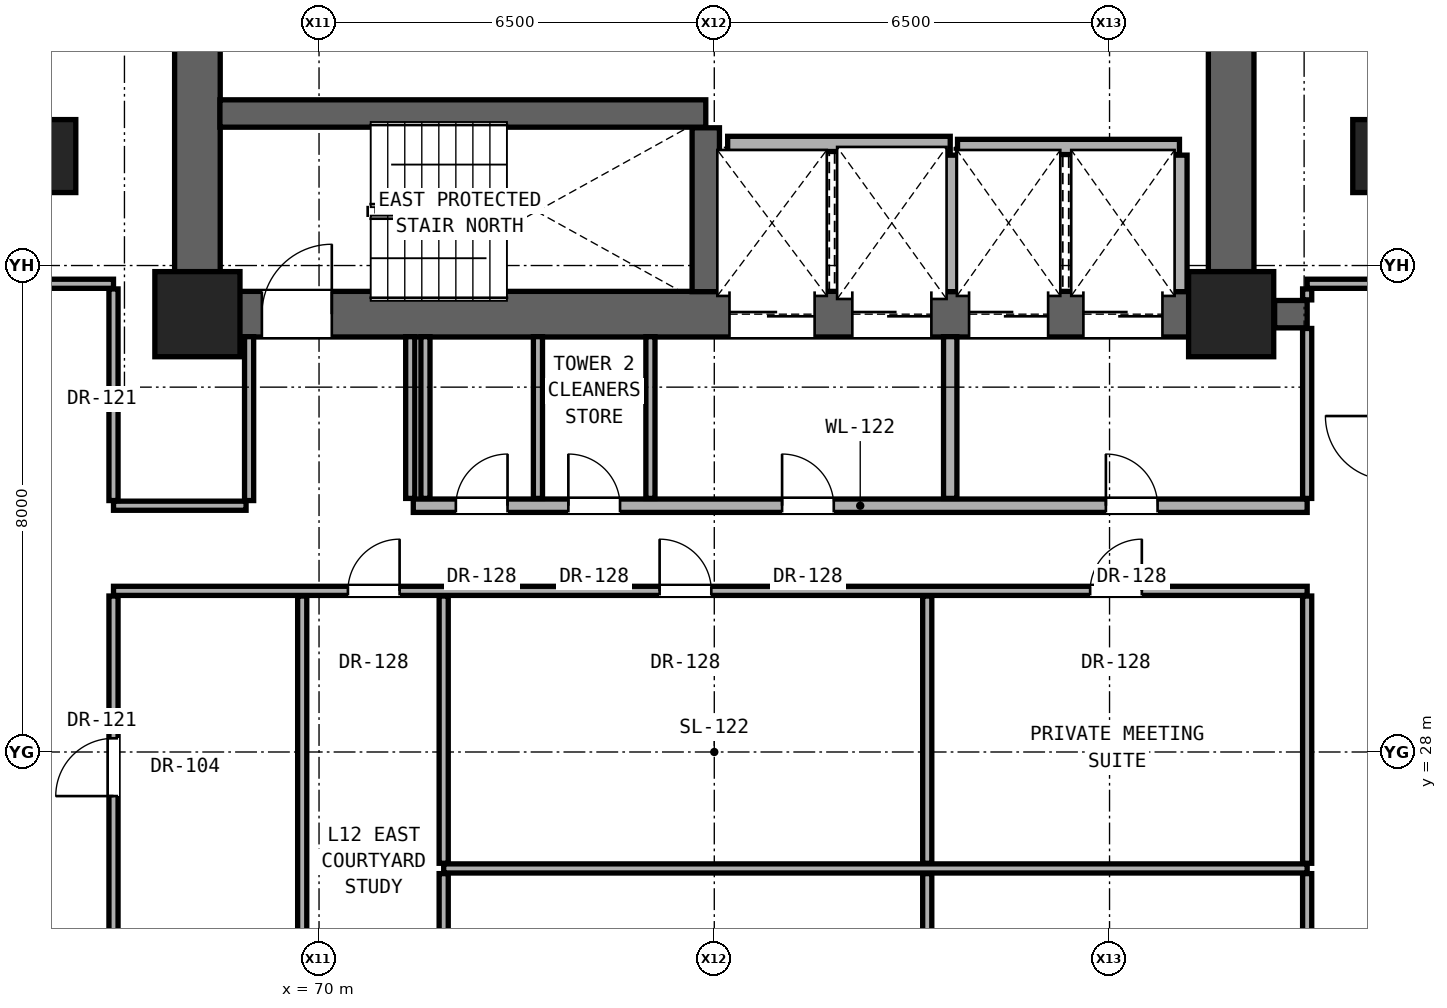
"""IFC4 building model, lengths in metres.
Left out: names, types, materials, properties, quantities, classifications, styles, units other than length and angle.
Written with IfcOpenShell. Run it as: python <this file> out.ifc"""

import sys

from ifc_helpers import new_model, si_unit, direction, frame, frame_2d, origin, origin_2d, place, context, subcontext, project, spatial, rectangle, extrude, element, fill, save


model = new_model("IFC4")
c1 = context("Model", 3, precision=1e-05, world=origin(), true_north=direction((0.0, 1.0)))
c2 = subcontext(c1, "Body", "Model", "MODEL_VIEW")
j1 = project(units=[si_unit("LENGTHUNIT", "METRE"), si_unit("PLANEANGLEUNIT", "RADIAN")], contexts=[c1])
p1 = place(None, origin())
s1 = spatial("IfcSite", under=j1, at=p1, CompositionType="ELEMENT")
p2 = place(p1, origin())
s2 = spatial("IfcBuilding", under=s1, at=p2, CompositionType="ELEMENT")
p3 = place(p2, frame((0.0, 0.0, 45.5)))
s3 = spatial("IfcBuildingStorey", under=s2, at=p3, CompositionType="ELEMENT", Elevation=45.5)
for number, where, z_axis, x_axis in (
    (1, (68.0, 35.2, 0.0), (0.0, 0.0, 1.0), (1.0, 0.0, 0.0)),
    (2, (85.0, 35.2, 0.0), (0.0, 0.0, 1.0), (1.0, 0.0, 0.0)),
):
    element("IfcColumn", number, at=place(p3, frame(where, z_axis=z_axis, x_axis=x_axis)), inside=s3, PredefinedType="COLUMN", context=c2, shape_type="SweptSolid", body=[
        extrude(rectangle(XDim=1.4, YDim=1.4, at=origin_2d()), origin(), (0.0, 0.0, 1.0), 3.3),
    ])
for number, where, z_axis, x_axis in (
    (3, (65.6, 37.8, 0.0), (0.0, 0.0, 1.0), (1.0, 0.0, 0.0)),
    (4, (87.4, 37.8, 0.0), (0.0, 0.0, 1.0), (1.0, 0.0, 0.0)),
):
    element("IfcColumn", number, at=place(p3, frame(where, z_axis=z_axis, x_axis=x_axis)), inside=s3, PredefinedType="PILASTER", context=c2, shape_type="SweptSolid", body=[
        extrude(rectangle(XDim=0.8, YDim=1.2, at=origin_2d()), origin(), (0.0, 0.0, 1.0), 3.3),
    ])
for number, where, z_axis, x_axis in (
    (5, (68.0, 35.2, 0.0), (0.0, 0.0, 1.0), (0.0, 1.0, 0.0)),
    (6, (85.0, 35.2, 0.0), (0.0, 0.0, 1.0), (0.0, 1.0, 0.0)),
):
    element("IfcWall", number, at=place(p3, frame(where, z_axis=z_axis, x_axis=x_axis)), inside=s3, PredefinedType="SHEAR", context=c2, shape_type="SweptSolid", body=[
        extrude(rectangle(XDim=5.6, YDim=0.75, at=frame_2d((2.8, 0.0))), origin(), (0.0, 0.0, 1.0), 3.06),
    ])
p4 = place(p3, frame((68.0, 35.2, 0.0), z_axis=(0.0, 0.0, 1.0), x_axis=(1.0, 0.0, 0.0)))
e7 = element("IfcWall", 7, at=p4, inside=s3, PredefinedType="SHEAR", context=c2, shape_type="SweptSolid", body=[
    extrude(rectangle(XDim=17.0, YDim=0.75, at=frame_2d((8.5, 0.0))), origin(), (0.0, 0.0, 1.0), 3.06),
])
p5 = place(p4, frame((1.06, 0.0, 0.0)))
e8 = element("IfcOpeningElement", 8, at=p5, cuts=e7, PredefinedType="OPENING", context=c2, shape_type="SweptSolid", body=[
    extrude(rectangle(XDim=1.15, YDim=2.2, at=frame_2d((0.575, 1.1))), frame((0.0, 0.385, 0.0), z_axis=(0.0, -1.0, 0.0), x_axis=(1.0, 0.0, 0.0)), (0.0, 0.0, 1.0), 0.77),
])
p6 = place(p4, frame((8.75, 0.0, 0.0)))
e9 = element("IfcOpeningElement", 9, at=p6, cuts=e7, PredefinedType="OPENING", context=c2, shape_type="SweptSolid", body=[
    extrude(rectangle(XDim=1.4, YDim=2.35, at=frame_2d((0.7, 1.175))), frame((0.0, 0.385, 0.0), z_axis=(0.0, -1.0, 0.0), x_axis=(1.0, 0.0, 0.0)), (0.0, 0.0, 1.0), 0.77),
])
p7 = place(p4, frame((10.77, 0.0, 0.0)))
e10 = element("IfcOpeningElement", 10, at=p7, cuts=e7, PredefinedType="OPENING", context=c2, shape_type="SweptSolid", body=[
    extrude(rectangle(XDim=1.3, YDim=2.3, at=frame_2d((0.65, 1.15))), frame((0.0, 0.385, 0.0), z_axis=(0.0, -1.0, 0.0), x_axis=(1.0, 0.0, 0.0)), (0.0, 0.0, 1.0), 0.77),
])
p8 = place(p4, frame((12.69, 0.0, 0.0)))
e11 = element("IfcOpeningElement", 11, at=p8, cuts=e7, PredefinedType="OPENING", context=c2, shape_type="SweptSolid", body=[
    extrude(rectangle(XDim=1.3, YDim=2.3, at=frame_2d((0.65, 1.15))), frame((0.0, 0.385, 0.0), z_axis=(0.0, -1.0, 0.0), x_axis=(1.0, 0.0, 0.0)), (0.0, 0.0, 1.0), 0.77),
])
p9 = place(p4, frame((14.57, 0.0, 0.0)))
e12 = element("IfcOpeningElement", 12, at=p9, cuts=e7, PredefinedType="OPENING", context=c2, shape_type="SweptSolid", body=[
    extrude(rectangle(XDim=1.3, YDim=2.3, at=frame_2d((0.65, 1.15))), frame((0.0, 0.385, 0.0), z_axis=(0.0, -1.0, 0.0), x_axis=(1.0, 0.0, 0.0)), (0.0, 0.0, 1.0), 0.77),
])
p10 = place(p3, frame((72.05, 26.085, 0.0), z_axis=(0.0, 0.0, 1.0), x_axis=(1.0, 0.0, 0.0)))
e13 = element("IfcWall", 13, at=p10, inside=s3, PredefinedType="PARTITIONING", context=c2, shape_type="SweptSolid", body=[
    extrude(rectangle(XDim=14.2, YDim=0.15, at=frame_2d((7.1, 0.0))), origin(), (0.0, 0.0, 1.0), 2.125),
])
p11 = place(p3, frame((66.62, 30.65, 0.0), z_axis=(0.0, 0.0, 1.0), x_axis=(1.0, 0.0, 0.0)))
e14 = element("IfcWall", 14, at=p11, inside=s3, PredefinedType="PARTITIONING", context=c2, shape_type="SweptSolid", body=[
    extrude(rectangle(XDim=19.63, YDim=0.15, at=frame_2d((9.815, 0.0))), origin(), (0.0, 0.0, 1.0), 2.125),
])
p12 = place(p11, frame((3.855, 0.0, 0.0)))
e15 = element("IfcOpeningElement", 15, at=p12, cuts=e14, PredefinedType="OPENING", context=c2, shape_type="SweptSolid", body=[
    extrude(rectangle(XDim=0.85, YDim=2.01, at=frame_2d((0.425, 1.005))), frame((0.0, 0.085, 0.0), z_axis=(0.0, -1.0, 0.0), x_axis=(1.0, 0.0, 0.0)), (0.0, 0.0, 1.0), 0.17),
])
p13 = place(p11, frame((8.981, 0.0, 0.0)))
e16 = element("IfcOpeningElement", 16, at=p13, cuts=e14, PredefinedType="OPENING", context=c2, shape_type="SweptSolid", body=[
    extrude(rectangle(XDim=0.85, YDim=2.01, at=frame_2d((0.425, 1.005))), frame((0.0, 0.085, 0.0), z_axis=(0.0, -1.0, 0.0), x_axis=(1.0, 0.0, 0.0)), (0.0, 0.0, 1.0), 0.17),
])
p14 = place(p11, frame((16.061, 0.0, 0.0)))
e17 = element("IfcOpeningElement", 17, at=p14, cuts=e14, PredefinedType="OPENING", context=c2, shape_type="SweptSolid", body=[
    extrude(rectangle(XDim=0.85, YDim=2.01, at=frame_2d((0.425, 1.005))), frame((0.0, 0.085, 0.0), z_axis=(0.0, -1.0, 0.0), x_axis=(1.0, 0.0, 0.0)), (0.0, 0.0, 1.0), 0.17),
])
p15 = place(p3, frame((66.62, 32.05, 0.0), z_axis=(0.0, 0.0, 1.0), x_axis=(1.0, 0.0, 0.0)))
e18 = element("IfcWall", 18, at=p15, inside=s3, PredefinedType="PARTITIONING", context=c2, shape_type="SweptSolid", body=[
    extrude(rectangle(XDim=2.18, YDim=0.15, at=frame_2d((1.09, 0.0))), origin(), (0.0, 0.0, 1.0), 2.125),
])
p16 = place(p3, frame((71.55, 32.05, 0.0), z_axis=(0.0, 0.0, 1.0), x_axis=(1.0, 0.0, 0.0)))
e19 = element("IfcWall", 19, at=p16, inside=s3, PredefinedType="SOLIDWALL", context=c2, shape_type="SweptSolid", body=[
    extrude(rectangle(XDim=14.7, YDim=0.22, at=frame_2d((7.35, 0.0))), origin(), (0.0, 0.0, 1.0), 2.125),
])
p17 = place(p16, frame((11.39, 0.0, 0.0)))
e20 = element("IfcOpeningElement", 20, at=p17, cuts=e19, PredefinedType="OPENING", context=c2, shape_type="SweptSolid", body=[
    extrude(rectangle(XDim=0.85, YDim=2.01, at=frame_2d((0.425, 1.005))), frame((0.0, 0.12, 0.0), z_axis=(0.0, -1.0, 0.0), x_axis=(1.0, 0.0, 0.0)), (0.0, 0.0, 1.0), 0.24),
])
p18 = place(p16, frame((6.065, 0.0, 0.0)))
e21 = element("IfcOpeningElement", 21, at=p18, cuts=e19, PredefinedType="OPENING", context=c2, shape_type="SweptSolid", body=[
    extrude(rectangle(XDim=0.85, YDim=2.01, at=frame_2d((0.425, 1.005))), frame((0.0, 0.12, 0.0), z_axis=(0.0, -1.0, 0.0), x_axis=(1.0, 0.0, 0.0)), (0.0, 0.0, 1.0), 0.24),
])
p19 = place(p16, frame((0.7, 0.0, 0.0)))
e22 = element("IfcOpeningElement", 22, at=p19, cuts=e19, PredefinedType="OPENING", context=c2, shape_type="SweptSolid", body=[
    extrude(rectangle(XDim=0.85, YDim=2.01, at=frame_2d((0.425, 1.005))), frame((0.0, 0.12, 0.0), z_axis=(0.0, -1.0, 0.0), x_axis=(1.0, 0.0, 0.0)), (0.0, 0.0, 1.0), 0.24),
])
p20 = place(p16, frame((2.55, 0.0, 0.0)))
e23 = element("IfcOpeningElement", 23, at=p20, cuts=e19, PredefinedType="OPENING", context=c2, shape_type="SweptSolid", body=[
    extrude(rectangle(XDim=0.85, YDim=2.01, at=frame_2d((0.425, 1.005))), frame((0.0, 0.12, 0.0), z_axis=(0.0, -1.0, 0.0), x_axis=(1.0, 0.0, 0.0)), (0.0, 0.0, 1.0), 0.24),
])
p21 = place(p3, frame((85.715, 35.2, 0.0), z_axis=(0.0, 0.0, 1.0), x_axis=(1.0, 0.0, 0.0)))
e24 = element("IfcWall", 24, at=p21, inside=s3, PredefinedType="SHEAR", context=c2, shape_type="SweptSolid", body=[
    extrude(rectangle(XDim=0.535, YDim=0.45, at=frame_2d((0.268, 0.0))), origin(), (0.0, 0.0, 1.0), 3.06),
])
p22 = place(p3, frame((65.25, 35.7, 0.0), z_axis=(0.0, 0.0, 1.0), x_axis=(1.0, 0.0, 0.0)))
e25 = element("IfcWall", 25, at=p22, inside=s3, PredefinedType="PARTITIONING", context=c2, shape_type="SweptSolid", body=[
    extrude(rectangle(XDim=1.37, YDim=0.15, at=frame_2d((0.685, 0.0))), origin(), (0.0, 0.0, 1.0), 3.06),
])
p23 = place(p3, frame((86.25, 35.7, 0.0), z_axis=(0.0, 0.0, 1.0), x_axis=(1.0, 0.0, 0.0)))
e26 = element("IfcWall", 26, at=p23, inside=s3, PredefinedType="PARTITIONING", context=c2, shape_type="SweptSolid", body=[
    extrude(rectangle(XDim=1.35, YDim=0.15, at=frame_2d((0.675, 0.0))), origin(), (0.0, 0.0, 1.0), 3.06),
])
p24 = place(p3, frame((80.5, 37.95, 0.0), z_axis=(0.0, 0.0, 1.0), x_axis=(1.0, 0.0, 0.0)))
e27 = element("IfcWall", 27, at=p24, inside=s3, PredefinedType="SOLIDWALL", context=c2, shape_type="SweptSolid", body=[
    extrude(rectangle(XDim=3.65, YDim=0.25, at=frame_2d((1.825, 0.0))), origin(), (0.0, 0.0, 1.0), 3.06),
])
p25 = place(p3, frame((76.72, 38.0, 0.0), z_axis=(0.0, 0.0, 1.0), x_axis=(1.0, 0.0, 0.0)))
e28 = element("IfcWall", 28, at=p25, inside=s3, PredefinedType="SOLIDWALL", context=c2, shape_type="SweptSolid", body=[
    extrude(rectangle(XDim=3.66, YDim=0.25, at=frame_2d((1.83, 0.0))), origin(), (0.0, 0.0, 1.0), 3.06),
])
p26 = place(p3, frame((68.37, 38.5, 0.0), z_axis=(0.0, 0.0, 1.0), x_axis=(1.0, 0.0, 0.0)))
e29 = element("IfcWall", 29, at=p26, inside=s3, PredefinedType="SHEAR", context=c2, shape_type="SweptSolid", body=[
    extrude(rectangle(XDim=7.99, YDim=0.45, at=frame_2d((3.995, 0.0))), origin(), (0.0, 0.0, 1.0), 3.06),
])
p27 = place(p3, frame((66.62, 24.935, 0.0), z_axis=(0.0, 0.0, 1.0), x_axis=(0.0, 1.0, 0.0)))
e30 = element("IfcWall", 30, at=p27, inside=s3, PredefinedType="PARTITIONING", context=c2, shape_type="SweptSolid", body=[
    extrude(rectangle(XDim=5.63, YDim=0.15, at=frame_2d((2.815, 0.0))), origin(), (0.0, 0.0, 1.0), 2.279),
])
p28 = place(p27, frame((2.34, 0.0, 0.0)))
e31 = element("IfcOpeningElement", 31, at=p28, cuts=e30, PredefinedType="OPENING", context=c2, shape_type="SweptSolid", body=[
    extrude(rectangle(XDim=0.95, YDim=2.15, at=frame_2d((0.475, 1.075))), frame((0.0, 0.085, 0.0), z_axis=(0.0, -1.0, 0.0), x_axis=(1.0, 0.0, 0.0)), (0.0, 0.0, 1.0), 0.17),
])
p29 = place(p3, frame((66.62, 32.135, 0.0), z_axis=(0.0, 0.0, 1.0), x_axis=(0.0, 1.0, 0.0)))
e32 = element("IfcWall", 32, at=p29, inside=s3, PredefinedType="PARTITIONING", context=c2, shape_type="SweptSolid", body=[
    extrude(rectangle(XDim=3.48, YDim=0.15, at=frame_2d((1.74, 0.0))), origin(), (0.0, 0.0, 1.0), 2.452),
])
p30 = place(p3, frame((68.85, 32.135, 0.0), z_axis=(0.0, 0.0, 1.0), x_axis=(0.0, 1.0, 0.0)))
e33 = element("IfcWall", 33, at=p30, inside=s3, PredefinedType="PARTITIONING", context=c2, shape_type="SweptSolid", body=[
    extrude(rectangle(XDim=2.695, YDim=0.15, at=frame_2d((1.348, 0.0))), origin(), (0.0, 0.0, 1.0), 3.06),
])
p31 = place(p3, frame((69.723, 24.935, 0.0), z_axis=(0.0, 0.0, 1.0), x_axis=(0.0, 1.0, 0.0)))
e34 = element("IfcWall", 34, at=p31, inside=s3, PredefinedType="PARTITIONING", context=c2, shape_type="SweptSolid", body=[
    extrude(rectangle(XDim=5.63, YDim=0.15, at=frame_2d((2.815, 0.0))), origin(), (0.0, 0.0, 1.0), 2.125),
])
for number, where, z_axis, x_axis in (
    (35, (71.5, 32.17, 0.0), (0.0, 0.0, 1.0), (0.0, 1.0, 0.0)),
    (36, (71.75, 32.17, 0.0), (0.0, 0.0, 1.0), (0.0, 1.0, 0.0)),
):
    element("IfcWall", number, at=place(p3, frame(where, z_axis=z_axis, x_axis=x_axis)), inside=s3, PredefinedType="PARTITIONING", context=c2, shape_type="SweptSolid", body=[
        extrude(rectangle(XDim=2.66, YDim=0.15, at=frame_2d((1.33, 0.0))), origin(), (0.0, 0.0, 1.0), 3.06),
    ])
p32 = place(p3, frame((72.05, 22.435, 0.0), z_axis=(0.0, 0.0, 1.0), x_axis=(0.0, 1.0, 0.0)))
e37 = element("IfcWall", 37, at=p32, inside=s3, PredefinedType="PARTITIONING", context=c2, shape_type="SweptSolid", body=[
    extrude(rectangle(XDim=3.565, YDim=0.15, at=frame_2d((1.782, 0.0))), origin(), (0.0, 0.0, 1.0), 2.589),
])
p33 = place(p3, frame((72.05, 26.17, 0.0), z_axis=(0.0, 0.0, 1.0), x_axis=(0.0, 1.0, 0.0)))
e38 = element("IfcWall", 38, at=p33, inside=s3, PredefinedType="PARTITIONING", context=c2, shape_type="SweptSolid", body=[
    extrude(rectangle(XDim=4.395, YDim=0.15, at=frame_2d((2.198, 0.0))), origin(), (0.0, 0.0, 1.0), 2.125),
])
for number, where, z_axis, x_axis in (
    (39, (73.6, 32.17, 0.0), (0.0, 0.0, 1.0), (0.0, 1.0, 0.0)),
    (40, (75.45, 32.17, 0.0), (0.0, 0.0, 1.0), (0.0, 1.0, 0.0)),
):
    element("IfcWall", number, at=place(p3, frame(where, z_axis=z_axis, x_axis=x_axis)), inside=s3, PredefinedType="PARTITIONING", context=c2, shape_type="SweptSolid", body=[
        extrude(rectangle(XDim=2.66, YDim=0.15, at=frame_2d((1.33, 0.0))), origin(), (0.0, 0.0, 1.0), 3.06),
    ])
p34 = place(p3, frame((76.36, 35.57, 0.0), z_axis=(0.0, 0.0, 1.0), x_axis=(0.0, 1.0, 0.0)))
e41 = element("IfcWall", 41, at=p34, inside=s3, PredefinedType="SHEAR", context=c2, shape_type="SweptSolid", body=[
    extrude(rectangle(XDim=2.695, YDim=0.45, at=frame_2d((1.347, 0.0))), origin(), (0.0, 0.0, 1.0), 3.06),
])
p35 = place(p3, frame((80.002, 22.435, 0.0), z_axis=(0.0, 0.0, 1.0), x_axis=(0.0, 1.0, 0.0)))
e42 = element("IfcWall", 42, at=p35, inside=s3, PredefinedType="PARTITIONING", context=c2, shape_type="SweptSolid", body=[
    extrude(rectangle(XDim=3.565, YDim=0.15, at=frame_2d((1.782, 0.0))), origin(), (0.0, 0.0, 1.0), 3.06),
])
p36 = place(p3, frame((80.002, 26.17, 0.0), z_axis=(0.0, 0.0, 1.0), x_axis=(0.0, 1.0, 0.0)))
e43 = element("IfcWall", 43, at=p36, inside=s3, PredefinedType="PARTITIONING", context=c2, shape_type="SweptSolid", body=[
    extrude(rectangle(XDim=4.395, YDim=0.15, at=frame_2d((2.198, 0.0))), origin(), (0.0, 0.0, 1.0), 2.125),
])
p37 = place(p3, frame((80.38, 32.17, 0.0), z_axis=(0.0, 0.0, 1.0), x_axis=(0.0, 1.0, 0.0)))
e44 = element("IfcWall", 44, at=p37, inside=s3, PredefinedType="SOLIDWALL", context=c2, shape_type="SweptSolid", body=[
    extrude(rectangle(XDim=2.66, YDim=0.22, at=frame_2d((1.33, 0.0))), origin(), (0.0, 0.0, 1.0), 3.06),
])
for number, where, z_axis, x_axis in (
    (45, (80.38, 35.57, 0.0), (0.0, 0.0, 1.0), (0.0, 1.0, 0.0)),
    (46, (84.15, 35.57, 0.0), (0.0, 0.0, 1.0), (0.0, 1.0, 0.0)),
):
    element("IfcWall", number, at=place(p3, frame(where, z_axis=z_axis, x_axis=x_axis)), inside=s3, PredefinedType="SOLIDWALL", context=c2, shape_type="SweptSolid", body=[
        extrude(rectangle(XDim=2.245, YDim=0.25, at=frame_2d((1.123, 0.0))), origin(), (0.0, 0.0, 1.0), 3.06),
    ])
p38 = place(p3, frame((86.25, 22.435, 0.0), z_axis=(0.0, 0.0, 1.0), x_axis=(0.0, 1.0, 0.0)))
e47 = element("IfcWall", 47, at=p38, inside=s3, PredefinedType="PARTITIONING", context=c2, shape_type="SweptSolid", body=[
    extrude(rectangle(XDim=3.565, YDim=0.15, at=frame_2d((1.782, 0.0))), origin(), (0.0, 0.0, 1.0), 3.06),
])
p39 = place(p3, frame((86.25, 26.17, 0.0), z_axis=(0.0, 0.0, 1.0), x_axis=(0.0, 1.0, 0.0)))
e48 = element("IfcWall", 48, at=p39, inside=s3, PredefinedType="PARTITIONING", context=c2, shape_type="SweptSolid", body=[
    extrude(rectangle(XDim=4.395, YDim=0.15, at=frame_2d((2.198, 0.0))), origin(), (0.0, 0.0, 1.0), 2.279),
])
p40 = place(p3, frame((86.25, 32.17, 0.0), z_axis=(0.0, 0.0, 1.0), x_axis=(0.0, 1.0, 0.0)))
e49 = element("IfcWall", 49, at=p40, inside=s3, PredefinedType="PARTITIONING", context=c2, shape_type="SweptSolid", body=[
    extrude(rectangle(XDim=2.795, YDim=0.15, at=frame_2d((1.397, 0.0))), origin(), (0.0, 0.0, 1.0), 2.452),
])
p41 = place(p3, frame((86.25, 35.435, 0.0), z_axis=(0.0, 0.0, 1.0), x_axis=(0.0, 1.0, 0.0)))
e50 = element("IfcWall", 50, at=p41, inside=s3, PredefinedType="PARTITIONING", context=c2, shape_type="SweptSolid", body=[
    extrude(rectangle(XDim=0.18, YDim=0.15, at=frame_2d((0.09, 0.0))), origin(), (0.0, 0.0, 1.0), 2.452),
])
p42 = place(p17, origin())
e51 = element("IfcDoor", 51, at=p42, inside=s3, OperationType="SINGLE_SWING_LEFT", PredefinedType="DOOR", context=c2, shape_type="SweptSolid", body=[
    extrude(rectangle(XDim=0.85, YDim=2.01, at=frame_2d((0.425, 1.005))), frame((0.0, 0.025, 0.0), z_axis=(0.0, -1.0, 0.0), x_axis=(1.0, 0.0, 0.0)), (0.0, 0.0, 1.0), 0.05),
])
fill(e20, e51)
p43 = place(p5, origin())
e52 = element("IfcDoor", 52, at=p43, inside=s3, OperationType="SINGLE_SWING_RIGHT", PredefinedType="DOOR", context=c2, shape_type="SweptSolid", body=[
    extrude(rectangle(XDim=1.15, YDim=2.2, at=frame_2d((0.575, 1.1))), frame((0.0, 0.025, 0.0), z_axis=(0.0, -1.0, 0.0), x_axis=(1.0, 0.0, 0.0)), (0.0, 0.0, 1.0), 0.05),
])
fill(e8, e52)
p44 = place(p18, origin())
e53 = element("IfcDoor", 53, at=p44, inside=s3, OperationType="SINGLE_SWING_LEFT", PredefinedType="DOOR", context=c2, shape_type="SweptSolid", body=[
    extrude(rectangle(XDim=0.85, YDim=2.01, at=frame_2d((0.425, 1.005))), frame((0.0, 0.025, 0.0), z_axis=(0.0, -1.0, 0.0), x_axis=(1.0, 0.0, 0.0)), (0.0, 0.0, 1.0), 0.05),
])
fill(e21, e53)
p45 = place(p19, origin())
e54 = element("IfcDoor", 54, at=p45, inside=s3, OperationType="SINGLE_SWING_RIGHT", PredefinedType="DOOR", context=c2, shape_type="SweptSolid", body=[
    extrude(rectangle(XDim=0.85, YDim=2.01, at=frame_2d((0.425, 1.005))), frame((0.0, 0.025, 0.0), z_axis=(0.0, -1.0, 0.0), x_axis=(1.0, 0.0, 0.0)), (0.0, 0.0, 1.0), 0.05),
])
fill(e22, e54)
p46 = place(p20, origin())
e55 = element("IfcDoor", 55, at=p46, inside=s3, OperationType="SINGLE_SWING_LEFT", PredefinedType="DOOR", context=c2, shape_type="SweptSolid", body=[
    extrude(rectangle(XDim=0.85, YDim=2.01, at=frame_2d((0.425, 1.005))), frame((0.0, 0.025, 0.0), z_axis=(0.0, -1.0, 0.0), x_axis=(1.0, 0.0, 0.0)), (0.0, 0.0, 1.0), 0.05),
])
fill(e23, e55)
p47 = place(p28, origin())
e56 = element("IfcDoor", 56, at=p47, inside=s3, OperationType="SINGLE_SWING_LEFT", PredefinedType="DOOR", context=c2, shape_type="SweptSolid", body=[
    extrude(rectangle(XDim=0.95, YDim=2.15, at=frame_2d((0.475, 1.075))), frame((0.0, 0.025, 0.0), z_axis=(0.0, -1.0, 0.0), x_axis=(1.0, 0.0, 0.0)), (0.0, 0.0, 1.0), 0.05),
])
fill(e31, e56)
p48 = place(p12, origin())
e57 = element("IfcDoor", 57, at=p48, inside=s3, OperationType="SINGLE_SWING_RIGHT", PredefinedType="DOOR", context=c2, shape_type="SweptSolid", body=[
    extrude(rectangle(XDim=0.85, YDim=2.01, at=frame_2d((0.425, 1.005))), frame((0.0, 0.025, 0.0), z_axis=(0.0, -1.0, 0.0), x_axis=(1.0, 0.0, 0.0)), (0.0, 0.0, 1.0), 0.05),
])
fill(e15, e57)
p49 = place(p13, origin())
e58 = element("IfcDoor", 58, at=p49, inside=s3, OperationType="SINGLE_SWING_LEFT", PredefinedType="DOOR", context=c2, shape_type="SweptSolid", body=[
    extrude(rectangle(XDim=0.85, YDim=2.01, at=frame_2d((0.425, 1.005))), frame((0.0, 0.025, 0.0), z_axis=(0.0, -1.0, 0.0), x_axis=(1.0, 0.0, 0.0)), (0.0, 0.0, 1.0), 0.05),
])
fill(e16, e58)
p50 = place(p14, origin())
e59 = element("IfcDoor", 59, at=p50, inside=s3, OperationType="SINGLE_SWING_RIGHT", PredefinedType="DOOR", context=c2, shape_type="SweptSolid", body=[
    extrude(rectangle(XDim=0.85, YDim=2.01, at=frame_2d((0.425, 1.005))), frame((0.0, 0.025, 0.0), z_axis=(0.0, -1.0, 0.0), x_axis=(1.0, 0.0, 0.0)), (0.0, 0.0, 1.0), 0.05),
])
fill(e17, e59)
p51 = place(p6, origin())
e60 = element("IfcDoor", 60, at=p51, inside=s3, OperationType="DOUBLE_DOOR_SLIDING", PredefinedType="DOOR", context=c2, shape_type="SweptSolid", body=[
    extrude(rectangle(XDim=1.4, YDim=2.35, at=frame_2d((0.7, 1.175))), frame((0.0, 0.025, 0.0), z_axis=(0.0, -1.0, 0.0), x_axis=(1.0, 0.0, 0.0)), (0.0, 0.0, 1.0), 0.05),
])
fill(e9, e60)
p52 = place(p7, origin())
e61 = element("IfcDoor", 61, at=p52, inside=s3, OperationType="DOUBLE_DOOR_SLIDING", PredefinedType="DOOR", context=c2, shape_type="SweptSolid", body=[
    extrude(rectangle(XDim=1.3, YDim=2.3, at=frame_2d((0.65, 1.15))), frame((0.0, 0.025, 0.0), z_axis=(0.0, -1.0, 0.0), x_axis=(1.0, 0.0, 0.0)), (0.0, 0.0, 1.0), 0.05),
])
fill(e10, e61)
p53 = place(p8, origin())
e62 = element("IfcDoor", 62, at=p53, inside=s3, OperationType="DOUBLE_DOOR_SLIDING", PredefinedType="DOOR", context=c2, shape_type="SweptSolid", body=[
    extrude(rectangle(XDim=1.3, YDim=2.3, at=frame_2d((0.65, 1.15))), frame((0.0, 0.025, 0.0), z_axis=(0.0, -1.0, 0.0), x_axis=(1.0, 0.0, 0.0)), (0.0, 0.0, 1.0), 0.05),
])
fill(e11, e62)
p54 = place(p9, origin())
e63 = element("IfcDoor", 63, at=p54, inside=s3, OperationType="DOUBLE_DOOR_SLIDING", PredefinedType="DOOR", context=c2, shape_type="SweptSolid", body=[
    extrude(rectangle(XDim=1.3, YDim=2.3, at=frame_2d((0.65, 1.15))), frame((0.0, 0.025, 0.0), z_axis=(0.0, -1.0, 0.0), x_axis=(1.0, 0.0, 0.0)), (0.0, 0.0, 1.0), 0.05),
])
fill(e12, e63)
save(model, sys.argv[1])
